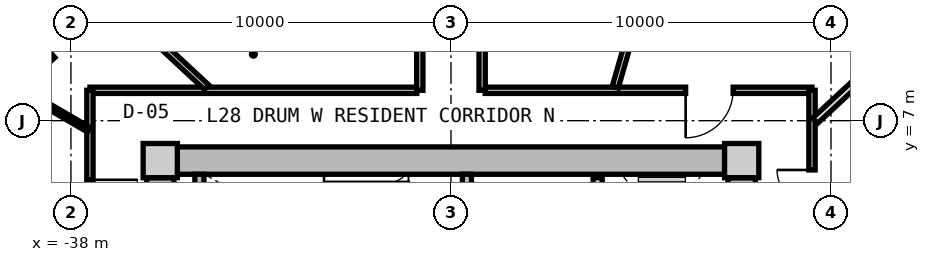
"""IFC4 building model, lengths in metres.
Left out: names, types, materials, properties, quantities, classifications, styles, units other than length and angle.
Written with IfcOpenShell. Run it as: python <this file> out.ifc"""

import sys

from ifc_helpers import new_model, si_unit, direction, frame, frame_2d, origin, origin_2d, place, context, subcontext, project, spatial, rectangle, extrude, source, transform, mapped, element, fill, save


model = new_model("IFC4")
c1 = context("Model", 3, precision=1e-05, world=origin(), true_north=direction((0.0, 1.0)))
c2 = subcontext(c1, "Body", "Model", "MODEL_VIEW")
j1 = project(units=[si_unit("LENGTHUNIT", "METRE"), si_unit("PLANEANGLEUNIT", "RADIAN")], contexts=[c1])
p1 = place(None, origin())
s1 = spatial("IfcSite", under=j1, at=p1, CompositionType="ELEMENT")
p2 = place(p1, origin())
s2 = spatial("IfcBuilding", under=s1, at=p2, CompositionType="ELEMENT")
p3 = place(p2, frame((0.0, 0.0, 93.2)))
s3 = spatial("IfcBuildingStorey", under=s2, at=p3, CompositionType="ELEMENT", Elevation=93.2)
m1 = source(origin(), c2, "Body", "SweptSolid", [
    extrude(rectangle(XDim=0.9, YDim=0.9, at=origin_2d()), origin(), (0.0, 0.0, 1.0), 3.05),
])
for number, where, z_axis, x_axis in (
    (1, (-20.35, 5.95, 0.0), (0.0, 0.0, 1.0), (1.0, 0.0, 0.0)),
    (2, (-35.65, 5.95, 0.0), (0.0, 0.0, 1.0), (1.0, 0.0, 0.0)),
):
    element("IfcColumn", number, at=place(p3, frame(where, z_axis=z_axis, x_axis=x_axis)), inside=s3, PredefinedType="COLUMN", context=c2, shape_type="MappedRepresentation", body=[
        mapped(m1, transform((0.0, 0.0, 0.0), x_axis=(1.0, 0.0, 0.0), y_axis=(0.0, 1.0, 0.0), z_axis=(0.0, 0.0, 1.0), scale=1.0)),
    ])
m2 = source(origin(), c2, "Body", "SweptSolid", [
    extrude(rectangle(XDim=14.4, YDim=0.72, at=frame_2d((7.2, 0.0))), origin(), (0.0, 0.0, 1.0), 2.79),
])
p4 = place(p3, frame((-35.2, 5.95, 0.0), z_axis=(0.0, 0.0, 1.0), x_axis=(1.0, 0.0, 0.0)))
e3 = element("IfcWall", 3, at=p4, inside=s3, PredefinedType="SHEAR", context=c2, shape_type="MappedRepresentation", body=[
    mapped(m2, transform((0.0, 0.0, 0.0), x_axis=(1.0, 0.0, 0.0), y_axis=(0.0, 1.0, 0.0), z_axis=(0.0, 0.0, 1.0), scale=1.0)),
])
m3 = source(origin(), c2, "Body", "SweptSolid", [
    extrude(rectangle(XDim=11.0, YDim=0.72, at=frame_2d((5.5, 0.0))), origin(), (0.0, 0.0, 1.0), 2.79),
])
p5 = place(p3, frame((-35.65, -5.5, 0.0), z_axis=(0.0, 0.0, 1.0), x_axis=(0.0, 1.0, 0.0)))
e4 = element("IfcWall", 4, at=p5, inside=s3, PredefinedType="SHEAR", context=c2, shape_type="MappedRepresentation", body=[
    mapped(m3, transform((0.0, 0.0, 0.0), x_axis=(1.0, 0.0, 0.0), y_axis=(0.0, 1.0, 0.0), z_axis=(0.0, 0.0, 1.0), scale=1.0)),
])
p6 = place(p5, frame((3.8, 0.0, 0.0)))
e5 = element("IfcOpeningElement", 5, at=p6, cuts=e4, PredefinedType="OPENING", context=c2, shape_type="SweptSolid", body=[
    extrude(rectangle(XDim=1.2, YDim=2.15, at=frame_2d((0.6, 1.075))), frame((0.0, 0.37, 0.0), z_axis=(0.0, -1.0, 0.0), x_axis=(1.0, 0.0, 0.0)), (0.0, 0.0, 1.0), 0.74),
])
p7 = place(p3, frame((-20.35, 5.5, 0.0), z_axis=(0.0, 0.0, 1.0), x_axis=(0.0, -1.0, 0.0)))
e6 = element("IfcWall", 6, at=p7, inside=s3, PredefinedType="SHEAR", context=c2, shape_type="MappedRepresentation", body=[
    mapped(m3, transform((0.0, 0.0, 0.0), x_axis=(1.0, 0.0, 0.0), y_axis=(0.0, 1.0, 0.0), z_axis=(0.0, 0.0, 1.0), scale=1.0)),
])
p8 = place(p7, frame((5.65, 0.0, 0.0)))
e7 = element("IfcOpeningElement", 7, at=p8, cuts=e6, PredefinedType="OPENING", context=c2, shape_type="SweptSolid", body=[
    extrude(rectangle(XDim=1.2, YDim=2.15, at=frame_2d((0.6, 1.075))), frame((0.0, 0.37, 0.0), z_axis=(0.0, -1.0, 0.0), x_axis=(1.0, 0.0, 0.0)), (0.0, 0.0, 1.0), 0.74),
])
p9 = place(p7, frame((9.3, 0.0, 0.0)))
e8 = element("IfcOpeningElement", 8, at=p9, cuts=e6, PredefinedType="OPENING", context=c2, shape_type="SweptSolid", body=[
    extrude(rectangle(XDim=1.0, YDim=2.1, at=frame_2d((0.5, 1.05))), frame((0.0, 0.37, 0.0), z_axis=(0.0, -1.0, 0.0), x_axis=(1.0, 0.0, 0.0)), (0.0, 0.0, 1.0), 0.74),
])
m4 = source(origin(), c2, "Body", "SweptSolid", [
    extrude(rectangle(XDim=3.14, YDim=0.24, at=frame_2d((1.57, 0.0))), origin(), (0.0, 0.0, 1.0), 2.79),
])
p10 = place(p3, frame((-34.62, 2.45, 0.0), z_axis=(0.0, 0.0, 1.0), x_axis=(0.0, 1.0, 0.0)))
e9 = element("IfcWall", 9, at=p10, inside=s3, PredefinedType="PARTITIONING", context=c2, shape_type="MappedRepresentation", body=[
    mapped(m4, transform((0.0, 0.0, 0.0), x_axis=(1.0, 0.0, 0.0), y_axis=(0.0, 1.0, 0.0), z_axis=(0.0, 0.0, 1.0), scale=1.0)),
])
p11 = place(p3, frame((-27.58, 2.45, 0.0), z_axis=(0.0, 0.0, 1.0), x_axis=(0.0, 1.0, 0.0)))
e10 = element("IfcWall", 10, at=p11, inside=s3, PredefinedType="PARTITIONING", context=c2, shape_type="MappedRepresentation", body=[
    mapped(m4, transform((0.0, 0.0, 0.0), x_axis=(1.0, 0.0, 0.0), y_axis=(0.0, 1.0, 0.0), z_axis=(0.0, 0.0, 1.0), scale=1.0)),
])
p12 = place(p11, frame((0.55, 0.0, 0.0)))
e11 = element("IfcOpeningElement", 11, at=p12, cuts=e10, PredefinedType="OPENING", context=c2, shape_type="SweptSolid", body=[
    extrude(rectangle(XDim=1.1, YDim=2.15, at=frame_2d((0.55, 1.075))), frame((0.0, 0.13, 0.0), z_axis=(0.0, -1.0, 0.0), x_axis=(1.0, 0.0, 0.0)), (0.0, 0.0, 1.0), 0.26),
])
m5 = source(origin(), c2, "Body", "SweptSolid", [
    extrude(rectangle(XDim=5.0, YDim=0.24, at=frame_2d((2.5, 0.0))), origin(), (0.0, 0.0, 1.0), 2.775),
])
p13 = place(p3, frame((-24.14, 0.5, 0.0), z_axis=(0.0, 0.0, 1.0), x_axis=(0.0, 1.0, 0.0)))
e12 = element("IfcWall", 12, at=p13, inside=s3, PredefinedType="PARTITIONING", context=c2, shape_type="MappedRepresentation", body=[
    mapped(m5, transform((0.0, 0.0, 0.0), x_axis=(1.0, 0.0, 0.0), y_axis=(0.0, 1.0, 0.0), z_axis=(0.0, 0.0, 1.0), scale=1.0)),
])
p14 = place(p13, frame((3.05, 0.0, 0.0)))
e13 = element("IfcOpeningElement", 13, at=p14, cuts=e12, PredefinedType="OPENING", context=c2, shape_type="SweptSolid", body=[
    extrude(rectangle(XDim=1.3, YDim=2.2, at=frame_2d((0.65, 1.1))), frame((0.0, 0.13, 0.0), z_axis=(0.0, -1.0, 0.0), x_axis=(1.0, 0.0, 0.0)), (0.0, 0.0, 1.0), 0.26),
])
p15 = place(p13, frame((0.55, 0.0, 0.0)))
e14 = element("IfcOpeningElement", 14, at=p15, cuts=e12, PredefinedType="OPENING", context=c2, shape_type="SweptSolid", body=[
    extrude(rectangle(XDim=1.3, YDim=2.2, at=frame_2d((0.65, 1.1))), frame((0.0, 0.13, 0.0), z_axis=(0.0, -1.0, 0.0), x_axis=(1.0, 0.0, 0.0)), (0.0, 0.0, 1.0), 0.26),
])
m6 = source(origin(), c2, "Body", "SweptSolid", [
    extrude(rectangle(XDim=8.6, YDim=0.165, at=frame_2d((4.3, 0.0))), origin(), (0.0, 0.0, 1.0), 2.775),
])
p16 = place(p3, frame((-37.5, 7.8, 0.0), z_axis=(0.0, 0.0, 1.0), x_axis=(1.0, 0.0, 0.0)))
e15 = element("IfcWall", 15, at=p16, inside=s3, PredefinedType="PARTITIONING", context=c2, shape_type="MappedRepresentation", body=[
    mapped(m6, transform((0.0, 0.0, 0.0), x_axis=(1.0, 0.0, 0.0), y_axis=(0.0, 1.0, 0.0), z_axis=(0.0, 0.0, 1.0), scale=1.0)),
])
p17 = place(p3, frame((-27.1, 7.8, 0.0), z_axis=(0.0, 0.0, 1.0), x_axis=(1.0, 0.0, 0.0)))
e16 = element("IfcWall", 16, at=p17, inside=s3, PredefinedType="PARTITIONING", context=c2, shape_type="MappedRepresentation", body=[
    mapped(m6, transform((0.0, 0.0, 0.0), x_axis=(1.0, 0.0, 0.0), y_axis=(0.0, 1.0, 0.0), z_axis=(0.0, 0.0, 1.0), scale=1.0)),
])
p18 = place(p17, frame((5.275, 0.0, 0.0)))
e17 = element("IfcOpeningElement", 17, at=p18, cuts=e16, PredefinedType="OPENING", context=c2, shape_type="SweptSolid", body=[
    extrude(rectangle(XDim=1.25, YDim=2.2, at=frame_2d((0.625, 1.1))), frame((0.0, 0.093, 0.0), z_axis=(0.0, -1.0, 0.0), x_axis=(1.0, 0.0, 0.0)), (0.0, 0.0, 1.0), 0.185),
])
m7 = source(origin(), c2, "Body", "SweptSolid", [
    extrude(rectangle(XDim=15.6, YDim=0.165, at=frame_2d((7.8, 0.0))), origin(), (0.0, 0.0, 1.0), 2.775),
])
p19 = place(p3, frame((-37.5, -7.8, 0.0), z_axis=(0.0, 0.0, 1.0), x_axis=(0.0, 1.0, 0.0)))
e18 = element("IfcWall", 18, at=p19, inside=s3, PredefinedType="PARTITIONING", context=c2, shape_type="MappedRepresentation", body=[
    mapped(m7, transform((0.0, 0.0, 0.0), x_axis=(1.0, 0.0, 0.0), y_axis=(0.0, 1.0, 0.0), z_axis=(0.0, 0.0, 1.0), scale=1.0)),
])
p20 = place(p19, frame((11.994, 0.0, 0.0)))
e19 = element("IfcOpeningElement", 19, at=p20, cuts=e18, PredefinedType="OPENING", context=c2, shape_type="SweptSolid", body=[
    extrude(rectangle(XDim=1.25, YDim=2.2, at=frame_2d((0.625, 1.1))), frame((0.0, 0.093, 0.0), z_axis=(0.0, -1.0, 0.0), x_axis=(1.0, 0.0, 0.0)), (0.0, 0.0, 1.0), 0.185),
])
p21 = place(p19, frame((4.867, 0.0, 0.0)))
e20 = element("IfcOpeningElement", 20, at=p21, cuts=e18, PredefinedType="OPENING", context=c2, shape_type="SweptSolid", body=[
    extrude(rectangle(XDim=1.25, YDim=2.2, at=frame_2d((0.625, 1.1))), frame((0.0, 0.093, 0.0), z_axis=(0.0, -1.0, 0.0), x_axis=(1.0, 0.0, 0.0)), (0.0, 0.0, 1.0), 0.185),
])
p22 = place(p3, frame((-18.5, 7.8, 0.0), z_axis=(0.0, 0.0, 1.0), x_axis=(0.0, -1.0, 0.0)))
e21 = element("IfcWall", 21, at=p22, inside=s3, PredefinedType="PARTITIONING", context=c2, shape_type="MappedRepresentation", body=[
    mapped(m7, transform((0.0, 0.0, 0.0), x_axis=(1.0, 0.0, 0.0), y_axis=(0.0, 1.0, 0.0), z_axis=(0.0, 0.0, 1.0), scale=1.0)),
])
p23 = place(p22, frame((9.734, 0.0, 0.0)))
e22 = element("IfcOpeningElement", 22, at=p23, cuts=e21, PredefinedType="OPENING", context=c2, shape_type="SweptSolid", body=[
    extrude(rectangle(XDim=1.25, YDim=2.2, at=frame_2d((0.625, 1.1))), frame((0.0, 0.093, 0.0), z_axis=(0.0, -1.0, 0.0), x_axis=(1.0, 0.0, 0.0)), (0.0, 0.0, 1.0), 0.185),
])
p24 = place(p22, frame((4.739, 0.0, 0.0)))
e23 = element("IfcOpeningElement", 23, at=p24, cuts=e21, PredefinedType="OPENING", context=c2, shape_type="SweptSolid", body=[
    extrude(rectangle(XDim=0.92, YDim=2.1, at=frame_2d((0.46, 1.05))), frame((0.0, 0.093, 0.0), z_axis=(0.0, -1.0, 0.0), x_axis=(1.0, 0.0, 0.0)), (0.0, 0.0, 1.0), 0.185),
])
p25 = place(p22, frame((2.096, 0.0, 0.0)))
e24 = element("IfcOpeningElement", 24, at=p25, cuts=e21, PredefinedType="OPENING", context=c2, shape_type="SweptSolid", body=[
    extrude(rectangle(XDim=0.92, YDim=2.1, at=frame_2d((0.46, 1.05))), frame((0.0, 0.093, 0.0), z_axis=(0.0, -1.0, 0.0), x_axis=(1.0, 0.0, 0.0)), (0.0, 0.0, 1.0), 0.185),
])
m8 = source(origin(), c2, "Body", "SweptSolid", [
    extrude(rectangle(XDim=8.989, YDim=0.165, at=frame_2d((4.495, 0.0))), origin(), (0.0, 0.0, 1.0), 2.275),
])
p26 = place(p3, frame((-23.678, 7.88, 0.0), z_axis=(0.0, 0.0, 1.0), x_axis=(0.27702323008, 0.960863221274, 0.0)))
e25 = element("IfcWall", 25, at=p26, inside=s3, PredefinedType="PARTITIONING", context=c2, shape_type="MappedRepresentation", body=[
    mapped(m8, transform((0.0, 0.0, 0.0), x_axis=(1.0, 0.0, 0.0), y_axis=(0.0, 1.0, 0.0), z_axis=(0.0, 0.0, 1.0), scale=1.0)),
])
m9 = source(origin(), c2, "Body", "SweptSolid", [
    extrude(rectangle(XDim=6.187, YDim=0.165, at=frame_2d((3.093, 0.0))), origin(), (0.0, 0.0, 1.0), 2.275),
])
p27 = place(p3, frame((-34.429, 7.88, 0.0), z_axis=(0.0, 0.0, 1.0), x_axis=(-0.732501077882, 0.680765870841, 0.0)))
e26 = element("IfcWall", 26, at=p27, inside=s3, PredefinedType="PARTITIONING", context=c2, shape_type="MappedRepresentation", body=[
    mapped(m9, transform((0.0, 0.0, 0.0), x_axis=(1.0, 0.0, 0.0), y_axis=(0.0, 1.0, 0.0), z_axis=(0.0, 0.0, 1.0), scale=1.0)),
])
m10 = source(origin(), c2, "Body", "SweptSolid", [
    extrude(rectangle(XDim=7.56, YDim=0.165, at=frame_2d((3.78, 0.0))), origin(), (0.0, 0.0, 1.0), 2.775),
])
p28 = place(p3, frame((-28.82, 7.8, 0.0), z_axis=(0.0, 0.0, 1.0), x_axis=(0.0, 1.0, 0.0)))
e27 = element("IfcWall", 27, at=p28, inside=s3, PredefinedType="PARTITIONING", context=c2, shape_type="MappedRepresentation", body=[
    mapped(m10, transform((0.0, 0.0, 0.0), x_axis=(1.0, 0.0, 0.0), y_axis=(0.0, 1.0, 0.0), z_axis=(0.0, 0.0, 1.0), scale=1.0)),
])
p29 = place(p28, frame((3.255, 0.0, 0.0)))
e28 = element("IfcOpeningElement", 28, at=p29, cuts=e27, PredefinedType="OPENING", context=c2, shape_type="SweptSolid", body=[
    extrude(rectangle(XDim=1.05, YDim=2.15, at=frame_2d((0.525, 1.075))), frame((0.0, 0.093, 0.0), z_axis=(0.0, -1.0, 0.0), x_axis=(1.0, 0.0, 0.0)), (0.0, 0.0, 1.0), 0.185),
])
p30 = place(p3, frame((-27.18, 7.8, 0.0), z_axis=(0.0, 0.0, 1.0), x_axis=(0.0, 1.0, 0.0)))
e29 = element("IfcWall", 29, at=p30, inside=s3, PredefinedType="PARTITIONING", context=c2, shape_type="MappedRepresentation", body=[
    mapped(m10, transform((0.0, 0.0, 0.0), x_axis=(1.0, 0.0, 0.0), y_axis=(0.0, 1.0, 0.0), z_axis=(0.0, 0.0, 1.0), scale=1.0)),
])
p31 = place(p30, frame((3.255, 0.0, 0.0)))
e30 = element("IfcOpeningElement", 30, at=p31, cuts=e29, PredefinedType="OPENING", context=c2, shape_type="SweptSolid", body=[
    extrude(rectangle(XDim=1.05, YDim=2.15, at=frame_2d((0.525, 1.075))), frame((0.0, 0.093, 0.0), z_axis=(0.0, -1.0, 0.0), x_axis=(1.0, 0.0, 0.0)), (0.0, 0.0, 1.0), 0.185),
])
m11 = source(origin(), c2, "Body", "SweptSolid", [
    extrude(rectangle(XDim=2.172, YDim=0.14, at=frame_2d((1.086, 0.0))), origin(), (0.0, 0.0, 1.0), 2.775),
])
p32 = place(p3, frame((-37.53, 6.762, 0.0), z_axis=(0.0, 0.0, 1.0), x_axis=(-0.863562702562, 0.504241468688, 0.0)))
e31 = element("IfcWall", 31, at=p32, inside=s3, PredefinedType="PARTITIONING", context=c2, shape_type="MappedRepresentation", body=[
    mapped(m11, transform((0.0, 0.0, 0.0), x_axis=(1.0, 0.0, 0.0), y_axis=(0.0, 1.0, 0.0), z_axis=(0.0, 0.0, 1.0), scale=1.0)),
])
m12 = source(origin(), c2, "Body", "SweptSolid", [
    extrude(rectangle(XDim=3.457, YDim=0.14, at=frame_2d((1.729, 0.0))), origin(), (0.0, 0.0, 1.0), 2.775),
])
p33 = place(p3, frame((-39.405, 7.857, 0.0), z_axis=(0.0, 0.0, 1.0), x_axis=(0.737567375492, 0.675273549467, 0.0)))
e32 = element("IfcWall", 32, at=p33, inside=s3, PredefinedType="PARTITIONING", context=c2, shape_type="MappedRepresentation", body=[
    mapped(m12, transform((0.0, 0.0, 0.0), x_axis=(1.0, 0.0, 0.0), y_axis=(0.0, 1.0, 0.0), z_axis=(0.0, 0.0, 1.0), scale=1.0)),
])
p34 = place(p33, frame((1.268, 0.0, 0.0)))
e33 = element("IfcOpeningElement", 33, at=p34, cuts=e32, PredefinedType="OPENING", context=c2, shape_type="SweptSolid", body=[
    extrude(rectangle(XDim=0.92, YDim=2.1, at=frame_2d((0.46, 1.05))), frame((0.0, 0.08, 0.0), z_axis=(0.0, -1.0, 0.0), x_axis=(1.0, 0.0, 0.0)), (0.0, 0.0, 1.0), 0.16),
])
m13 = source(origin(), c2, "Body", "SweptSolid", [
    extrude(rectangle(XDim=7.482, YDim=0.19, at=frame_2d((3.741, 0.0))), origin(), (0.0, 0.0, 1.0), 2.275),
])
p35 = place(p3, frame((-18.42, 6.998, 0.0), z_axis=(0.0, 0.0, 1.0), x_axis=(0.732508698043, 0.680757671489, 0.0)))
e34 = element("IfcWall", 34, at=p35, inside=s3, PredefinedType="PARTITIONING", context=c2, shape_type="MappedRepresentation", body=[
    mapped(m13, transform((0.0, 0.0, 0.0), x_axis=(1.0, 0.0, 0.0), y_axis=(0.0, 1.0, 0.0), z_axis=(0.0, 0.0, 1.0), scale=1.0)),
])
m14 = source(origin(), c2, "Body", "SweptSolid", [
    extrude(rectangle(XDim=9.447, YDim=0.14, at=frame_2d((4.724, 0.0))), origin(), (0.0, 0.0, 1.0), 2.775),
])
p36 = place(p3, frame((-18.47, 3.289, 0.0), z_axis=(0.0, 0.0, 1.0), x_axis=(0.918162367414, 0.396204324894, 0.0)))
e35 = element("IfcWall", 35, at=p36, inside=s3, PredefinedType="PARTITIONING", context=c2, shape_type="MappedRepresentation", body=[
    mapped(m14, transform((0.0, 0.0, 0.0), x_axis=(1.0, 0.0, 0.0), y_axis=(0.0, 1.0, 0.0), z_axis=(0.0, 0.0, 1.0), scale=1.0)),
])
m15 = source(origin(), c2, "Body", "SweptSolid", [
    extrude(rectangle(XDim=1.25, YDim=2.2, at=frame_2d((0.625, 1.1))), frame((0.0, 0.025, 0.0), z_axis=(0.0, -1.0, 0.0), x_axis=(1.0, 0.0, 0.0)), (0.0, 0.0, 1.0), 0.05),
])
p37 = place(p20, frame((1.25, 0.0, 0.0), z_axis=(0.0, 0.0, 1.0), x_axis=(-1.0, 0.0, 0.0)))
e36 = element("IfcDoor", 36, at=p37, inside=s3, OperationType="SINGLE_SWING_LEFT", PredefinedType="DOOR", context=c2, shape_type="MappedRepresentation", body=[
    mapped(m15, transform((0.0, 0.0, 0.0), x_axis=(1.0, 0.0, 0.0), y_axis=(0.0, 1.0, 0.0), z_axis=(0.0, 0.0, 1.0), scale=1.0)),
])
fill(e19, e36)
m16 = source(origin(), c2, "Body", "SweptSolid", [
    extrude(rectangle(XDim=0.92, YDim=2.1, at=frame_2d((0.46, 1.05))), frame((0.0, 0.025, 0.0), z_axis=(0.0, -1.0, 0.0), x_axis=(1.0, 0.0, 0.0)), (0.0, 0.0, 1.0), 0.05),
])
p38 = place(p34, origin())
e37 = element("IfcDoor", 37, at=p38, inside=s3, OperationType="SINGLE_SWING_RIGHT", PredefinedType="DOOR", context=c2, shape_type="MappedRepresentation", body=[
    mapped(m16, transform((0.0, 0.0, 0.0), x_axis=(1.0, 0.0, 0.0), y_axis=(0.0, 1.0, 0.0), z_axis=(0.0, 0.0, 1.0), scale=1.0)),
])
fill(e33, e37)
p39 = place(p25, frame((0.92, 0.0, 0.0), z_axis=(0.0, 0.0, 1.0), x_axis=(-1.0, 0.0, 0.0)))
e38 = element("IfcDoor", 38, at=p39, inside=s3, OperationType="SINGLE_SWING_RIGHT", PredefinedType="DOOR", context=c2, shape_type="MappedRepresentation", body=[
    mapped(m16, transform((0.0, 0.0, 0.0), x_axis=(1.0, 0.0, 0.0), y_axis=(0.0, 1.0, 0.0), z_axis=(0.0, 0.0, 1.0), scale=1.0)),
])
fill(e24, e38)
p40 = place(p18, frame((1.25, 0.0, 0.0), z_axis=(0.0, 0.0, 1.0), x_axis=(-1.0, 0.0, 0.0)))
e39 = element("IfcDoor", 39, at=p40, inside=s3, OperationType="SINGLE_SWING_RIGHT", PredefinedType="DOOR", context=c2, shape_type="MappedRepresentation", body=[
    mapped(m15, transform((0.0, 0.0, 0.0), x_axis=(1.0, 0.0, 0.0), y_axis=(0.0, 1.0, 0.0), z_axis=(0.0, 0.0, 1.0), scale=1.0)),
])
fill(e17, e39)
save(model, sys.argv[1])
